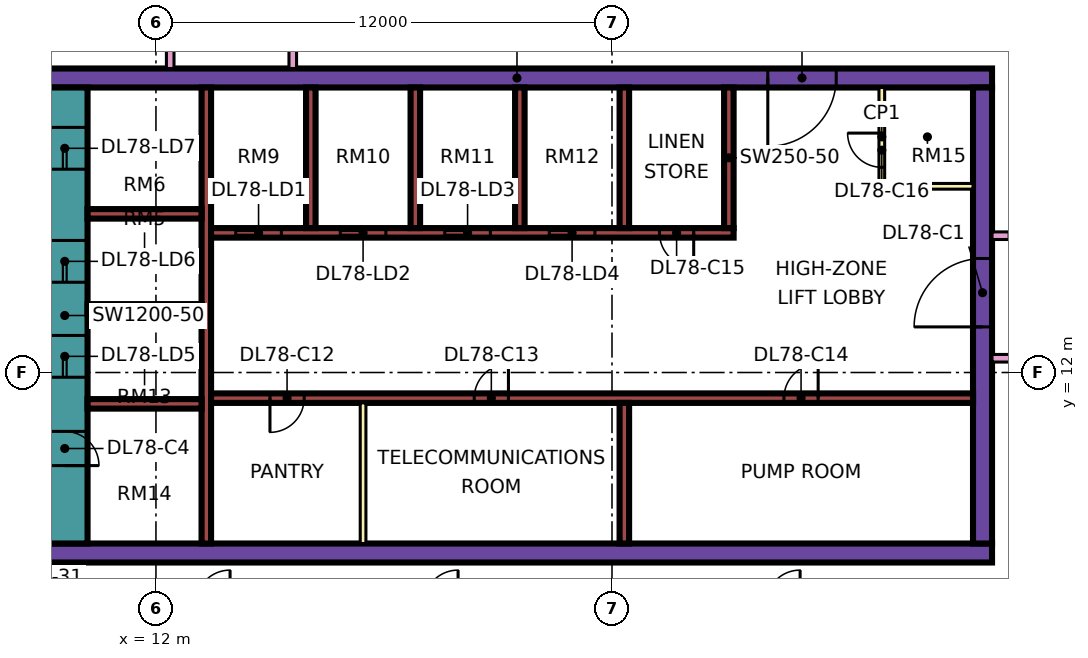
"""IFC4 building model, lengths in metres.
Left out: names, types, materials, properties, quantities, classifications, styles, units other than length and angle.
Written with IfcOpenShell. Run it as: python <this file> out.ifc"""

import sys

from ifc_helpers import new_model, si_unit, direction, frame, frame_2d, origin, place, context, subcontext, project, spatial, rectangle, extrude, element, fill, save


model = new_model("IFC4")
c1 = context("Model", 3, precision=1e-05, world=origin(), true_north=direction((0.0, 1.0)))
c2 = subcontext(c1, "Body", "Model", "MODEL_VIEW")
j1 = project(units=[si_unit("LENGTHUNIT", "METRE"), si_unit("PLANEANGLEUNIT", "RADIAN")], contexts=[c1])
p1 = place(None, origin())
s1 = spatial("IfcSite", under=j1, at=p1, CompositionType="ELEMENT")
p2 = place(p1, origin())
s2 = spatial("IfcBuilding", under=s1, at=p2, CompositionType="ELEMENT")
p3 = place(p2, frame((0.0, 0.0, 338.9)))
s3 = spatial("IfcBuildingStorey", under=s2, at=p3, CompositionType="ELEMENT", Elevation=338.9)
p4 = place(p3, frame((9.0, 7.25, 0.0), z_axis=(0.0, 0.0, 1.0), x_axis=(1.0, 0.0, 0.0)))
e1 = element("IfcWall", 1, at=p4, inside=s3, PredefinedType="SHEAR", context=c2, shape_type="SweptSolid", body=[
    extrude(rectangle(XDim=25.0, YDim=0.5, at=frame_2d((12.5, 0.0))), origin(), (0.0, 0.0, 1.0), 3.75),
])
p5 = place(p3, frame((9.0, 19.75, 0.0), z_axis=(0.0, 0.0, 1.0), x_axis=(1.0, 0.0, 0.0)))
e2 = element("IfcWall", 2, at=p5, inside=s3, PredefinedType="SHEAR", context=c2, shape_type="SweptSolid", body=[
    extrude(rectangle(XDim=25.0, YDim=0.5, at=frame_2d((12.5, 0.0))), origin(), (0.0, 0.0, 1.0), 3.75),
])
p6 = place(p5, frame((19.1, 0.0, 0.0)))
e3 = element("IfcOpeningElement", 3, at=p6, cuts=e2, PredefinedType="OPENING", context=c2, shape_type="SweptSolid", body=[
    extrude(rectangle(XDim=1.8, YDim=2.4, at=frame_2d((0.9, 1.2))), frame((0.0, 0.26, 0.0), z_axis=(0.0, -1.0, 0.0), x_axis=(1.0, 0.0, 0.0)), (0.0, 0.0, 1.0), 0.52),
])
p7 = place(p3, frame((9.6, 7.5, 0.0), z_axis=(0.0, 0.0, 1.0), x_axis=(0.0, 1.0, 0.0)))
e4 = element("IfcWall", 4, at=p7, inside=s3, PredefinedType="SHEAR", context=c2, shape_type="SweptSolid", body=[
    extrude(rectangle(XDim=12.0, YDim=1.2, at=frame_2d((6.0, 0.0))), origin(), (0.0, 0.0, 1.0), 3.75),
])
p8 = place(p7, frame((4.375, 0.0, 0.0)))
e5 = element("IfcOpeningElement", 5, at=p8, cuts=e4, PredefinedType="OPENING", context=c2, shape_type="SweptSolid", body=[
    extrude(rectangle(XDim=1.1, YDim=2.2, at=frame_2d((0.55, 1.1))), frame((0.0, 0.61, 0.0), z_axis=(0.0, -1.0, 0.0), x_axis=(1.0, 0.0, 0.0)), (0.0, 0.0, 1.0), 1.22),
])
p9 = place(p7, frame((6.875, 0.0, 0.0)))
e6 = element("IfcOpeningElement", 6, at=p9, cuts=e4, PredefinedType="OPENING", context=c2, shape_type="SweptSolid", body=[
    extrude(rectangle(XDim=1.1, YDim=2.2, at=frame_2d((0.55, 1.1))), frame((0.0, 0.61, 0.0), z_axis=(0.0, -1.0, 0.0), x_axis=(1.0, 0.0, 0.0)), (0.0, 0.0, 1.0), 1.22),
])
p10 = place(p7, frame((9.85, 0.0, 0.0)))
e7 = element("IfcOpeningElement", 7, at=p10, cuts=e4, PredefinedType="OPENING", context=c2, shape_type="SweptSolid", body=[
    extrude(rectangle(XDim=1.1, YDim=2.2, at=frame_2d((0.55, 1.1))), frame((0.0, 0.61, 0.0), z_axis=(0.0, -1.0, 0.0), x_axis=(1.0, 0.0, 0.0)), (0.0, 0.0, 1.0), 1.22),
])
p11 = place(p7, frame((2.05, 0.0, 0.0)))
e8 = element("IfcOpeningElement", 8, at=p11, cuts=e4, PredefinedType="OPENING", context=c2, shape_type="SweptSolid", body=[
    extrude(rectangle(XDim=0.9, YDim=2.1, at=frame_2d((0.45, 1.05))), frame((0.0, 0.61, 0.0), z_axis=(0.0, -1.0, 0.0), x_axis=(1.0, 0.0, 0.0)), (0.0, 0.0, 1.0), 1.22),
])
p12 = place(p3, frame((33.75, 7.5, 0.0), z_axis=(0.0, 0.0, 1.0), x_axis=(0.0, 1.0, 0.0)))
e9 = element("IfcWall", 9, at=p12, inside=s3, PredefinedType="SHEAR", context=c2, shape_type="SweptSolid", body=[
    extrude(rectangle(XDim=12.0, YDim=0.5, at=frame_2d((6.0, 0.0))), origin(), (0.0, 0.0, 1.0), 3.75),
])
p13 = place(p12, frame((5.7, 0.0, 0.0)))
e10 = element("IfcOpeningElement", 10, at=p13, cuts=e9, PredefinedType="OPENING", context=c2, shape_type="SweptSolid", body=[
    extrude(rectangle(XDim=1.8, YDim=2.4, at=frame_2d((0.9, 1.2))), frame((0.0, 0.26, 0.0), z_axis=(0.0, -1.0, 0.0), x_axis=(1.0, 0.0, 0.0)), (0.0, 0.0, 1.0), 0.52),
])
p14 = place(p3, frame((13.325, 7.5, 0.0), z_axis=(0.0, 0.0, 1.0), x_axis=(0.0, 1.0, 0.0)))
e11 = element("IfcWall", 11, at=p14, inside=s3, PredefinedType="SHEAR", context=c2, shape_type="SweptSolid", body=[
    extrude(rectangle(XDim=12.0, YDim=0.25, at=frame_2d((6.0, 0.0))), origin(), (0.0, 0.0, 1.0), 3.75),
])
p15 = place(p3, frame((13.45, 11.325, 0.0), z_axis=(0.0, 0.0, 1.0), x_axis=(1.0, 0.0, 0.0)))
e12 = element("IfcWall", 12, at=p15, inside=s3, PredefinedType="SHEAR", context=c2, shape_type="SweptSolid", body=[
    extrude(rectangle(XDim=20.05, YDim=0.25, at=frame_2d((10.025, 0.0))), origin(), (0.0, 0.0, 1.0), 3.75),
])
p16 = place(p15, frame((1.55, 0.0, 0.0)))
e13 = element("IfcOpeningElement", 13, at=p16, cuts=e12, PredefinedType="OPENING", context=c2, shape_type="SweptSolid", body=[
    extrude(rectangle(XDim=0.9, YDim=2.1, at=frame_2d((0.45, 1.05))), frame((0.0, 0.135, 0.0), z_axis=(0.0, -1.0, 0.0), x_axis=(1.0, 0.0, 0.0)), (0.0, 0.0, 1.0), 0.27),
])
p17 = place(p15, frame((6.925, 0.0, 0.0)))
e14 = element("IfcOpeningElement", 14, at=p17, cuts=e12, PredefinedType="OPENING", context=c2, shape_type="SweptSolid", body=[
    extrude(rectangle(XDim=0.9, YDim=2.1, at=frame_2d((0.45, 1.05))), frame((0.0, 0.135, 0.0), z_axis=(0.0, -1.0, 0.0), x_axis=(1.0, 0.0, 0.0)), (0.0, 0.0, 1.0), 0.27),
])
p18 = place(p15, frame((15.075, 0.0, 0.0)))
e15 = element("IfcOpeningElement", 15, at=p18, cuts=e12, PredefinedType="OPENING", context=c2, shape_type="SweptSolid", body=[
    extrude(rectangle(XDim=0.9, YDim=2.1, at=frame_2d((0.45, 1.05))), frame((0.0, 0.135, 0.0), z_axis=(0.0, -1.0, 0.0), x_axis=(1.0, 0.0, 0.0)), (0.0, 0.0, 1.0), 0.27),
])
p19 = place(p3, frame((13.45, 15.675, 0.0), z_axis=(0.0, 0.0, 1.0), x_axis=(1.0, 0.0, 0.0)))
e16 = element("IfcWall", 16, at=p19, inside=s3, PredefinedType="SHEAR", context=c2, shape_type="SweptSolid", body=[
    extrude(rectangle(XDim=13.75, YDim=0.25, at=frame_2d((6.875, 0.0))), origin(), (0.0, 0.0, 1.0), 3.75),
])
p20 = place(p19, frame((0.65, 0.0, 0.0)))
e17 = element("IfcOpeningElement", 17, at=p20, cuts=e16, PredefinedType="OPENING", context=c2, shape_type="SweptSolid", body=[
    extrude(rectangle(XDim=1.2, YDim=2.2, at=frame_2d((0.6, 1.1))), frame((0.0, 0.135, 0.0), z_axis=(0.0, -1.0, 0.0), x_axis=(1.0, 0.0, 0.0)), (0.0, 0.0, 1.0), 0.27),
])
p21 = place(p19, frame((3.4, 0.0, 0.0)))
e18 = element("IfcOpeningElement", 18, at=p21, cuts=e16, PredefinedType="OPENING", context=c2, shape_type="SweptSolid", body=[
    extrude(rectangle(XDim=1.2, YDim=2.2, at=frame_2d((0.6, 1.1))), frame((0.0, 0.135, 0.0), z_axis=(0.0, -1.0, 0.0), x_axis=(1.0, 0.0, 0.0)), (0.0, 0.0, 1.0), 0.27),
])
p22 = place(p19, frame((6.15, 0.0, 0.0)))
e19 = element("IfcOpeningElement", 19, at=p22, cuts=e16, PredefinedType="OPENING", context=c2, shape_type="SweptSolid", body=[
    extrude(rectangle(XDim=1.2, YDim=2.2, at=frame_2d((0.6, 1.1))), frame((0.0, 0.135, 0.0), z_axis=(0.0, -1.0, 0.0), x_axis=(1.0, 0.0, 0.0)), (0.0, 0.0, 1.0), 0.27),
])
p23 = place(p19, frame((8.9, 0.0, 0.0)))
e20 = element("IfcOpeningElement", 20, at=p23, cuts=e16, PredefinedType="OPENING", context=c2, shape_type="SweptSolid", body=[
    extrude(rectangle(XDim=1.2, YDim=2.2, at=frame_2d((0.6, 1.1))), frame((0.0, 0.135, 0.0), z_axis=(0.0, -1.0, 0.0), x_axis=(1.0, 0.0, 0.0)), (0.0, 0.0, 1.0), 0.27),
])
p24 = place(p19, frame((11.8, 0.0, 0.0)))
e21 = element("IfcOpeningElement", 21, at=p24, cuts=e16, PredefinedType="OPENING", context=c2, shape_type="SweptSolid", body=[
    extrude(rectangle(XDim=0.9, YDim=2.1, at=frame_2d((0.45, 1.05))), frame((0.0, 0.135, 0.0), z_axis=(0.0, -1.0, 0.0), x_axis=(1.0, 0.0, 0.0)), (0.0, 0.0, 1.0), 0.27),
])
for number, where, z_axis, x_axis in (
    (22, (10.2, 11.175, 0.0), (0.0, 0.0, 1.0), (1.0, 0.0, 0.0)),
    (23, (10.2, 13.675, 0.0), (0.0, 0.0, 1.0), (1.0, 0.0, 0.0)),
    (24, (10.2, 16.175, 0.0), (0.0, 0.0, 1.0), (1.0, 0.0, 0.0)),
):
    element("IfcWall", number, at=place(p3, frame(where, z_axis=z_axis, x_axis=x_axis)), inside=s3, PredefinedType="SHEAR", context=c2, shape_type="SweptSolid", body=[
        extrude(rectangle(XDim=3.0, YDim=0.25, at=frame_2d((1.5, 0.0))), origin(), (0.0, 0.0, 1.0), 3.75),
    ])
for number, where, z_axis, x_axis in (
    (25, (24.325, 7.5, 0.0), (0.0, 0.0, 1.0), (0.0, 1.0, 0.0)),
    (26, (16.075, 15.8, 0.0), (0.0, 0.0, 1.0), (0.0, 1.0, 0.0)),
    (27, (18.825, 15.8, 0.0), (0.0, 0.0, 1.0), (0.0, 1.0, 0.0)),
    (28, (21.575, 15.8, 0.0), (0.0, 0.0, 1.0), (0.0, 1.0, 0.0)),
    (29, (24.325, 15.8, 0.0), (0.0, 0.0, 1.0), (0.0, 1.0, 0.0)),
    (30, (27.075, 15.8, 0.0), (0.0, 0.0, 1.0), (0.0, 1.0, 0.0)),
):
    element("IfcWall", number, at=place(p3, frame(where, z_axis=z_axis, x_axis=x_axis)), inside=s3, PredefinedType="SHEAR", context=c2, shape_type="SweptSolid", body=[
        extrude(rectangle(XDim=3.7, YDim=0.25, at=frame_2d((1.85, 0.0))), origin(), (0.0, 0.0, 1.0), 3.75),
    ])
p25 = place(p3, frame((-1.447, 12.553, 0.0), z_axis=(0.0, 0.0, 1.0), x_axis=(0.707106781187, -0.707106781187, 0.0)))
e31 = element("IfcWall", 31, at=p25, inside=s3, PredefinedType="SOLIDWALL", context=c2, shape_type="SweptSolid", body=[
    extrude(rectangle(XDim=19.799, YDim=0.15, at=frame_2d((9.899, 0.0))), origin(), (0.0, 0.0, 1.0), 3.35),
])
p26 = place(p25, frame((2.212, 0.0, 0.45)))
e32 = element("IfcOpeningElement", 32, at=p26, cuts=e31, PredefinedType="OPENING", context=c2, shape_type="SweptSolid", body=[
    extrude(rectangle(XDim=3.0, YDim=2.4, at=frame_2d((1.5, 1.2))), frame((0.0, 0.085, 0.0), z_axis=(0.0, -1.0, 0.0), x_axis=(1.0, 0.0, 0.0)), (0.0, 0.0, 1.0), 0.17),
])
p27 = place(p25, frame((10.216, 0.0, 0.45)))
e33 = element("IfcOpeningElement", 33, at=p27, cuts=e31, PredefinedType="OPENING", context=c2, shape_type="SweptSolid", body=[
    extrude(rectangle(XDim=3.0, YDim=2.4, at=frame_2d((1.5, 1.2))), frame((0.0, 0.085, 0.0), z_axis=(0.0, -1.0, 0.0), x_axis=(1.0, 0.0, 0.0)), (0.0, 0.0, 1.0), 0.17),
])
p28 = place(p3, frame((17.45, 7.5, 0.0), z_axis=(0.0, 0.0, 1.0), x_axis=(0.0, 1.0, 0.0)))
e34 = element("IfcWall", 34, at=p28, inside=s3, PredefinedType="PARTITIONING", context=c2, shape_type="SweptSolid", body=[
    extrude(rectangle(XDim=3.7, YDim=0.15, at=frame_2d((1.85, 0.0))), origin(), (0.0, 0.0, 1.0), 3.35),
])
p29 = place(p3, frame((31.1, 16.9, 0.0), z_axis=(0.0, 0.0, 1.0), x_axis=(0.0, 1.0, 0.0)))
e35 = element("IfcWall", 35, at=p29, inside=s3, PredefinedType="PARTITIONING", context=c2, shape_type="SweptSolid", body=[
    extrude(rectangle(XDim=2.6, YDim=0.15, at=frame_2d((1.3, 0.0))), origin(), (0.0, 0.0, 1.0), 3.35),
])
p30 = place(p29, frame((0.5, 0.0, 0.0)))
e36 = element("IfcOpeningElement", 36, at=p30, cuts=e35, PredefinedType="OPENING", context=c2, shape_type="SweptSolid", body=[
    extrude(rectangle(XDim=0.9, YDim=2.1, at=frame_2d((0.45, 1.05))), frame((0.0, 0.085, 0.0), z_axis=(0.0, -1.0, 0.0), x_axis=(1.0, 0.0, 0.0)), (0.0, 0.0, 1.0), 0.17),
])
p31 = place(p3, frame((31.1, 16.9, 0.0), z_axis=(0.0, 0.0, 1.0), x_axis=(1.0, 0.0, 0.0)))
e37 = element("IfcWall", 37, at=p31, inside=s3, PredefinedType="PARTITIONING", context=c2, shape_type="SweptSolid", body=[
    extrude(rectangle(XDim=2.4, YDim=0.15, at=frame_2d((1.2, 0.0))), origin(), (0.0, 0.0, 1.0), 3.35),
])
p32 = place(p3, frame((12.375, 20.0, 0.0), z_axis=(0.0, 0.0, 1.0), x_axis=(0.0, 1.0, 0.0)))
e38 = element("IfcWall", 38, at=p32, inside=s3, PredefinedType="PARTITIONING", context=c2, shape_type="SweptSolid", body=[
    extrude(rectangle(XDim=34.0, YDim=0.2, at=frame_2d((17.0, 0.0))), origin(), (0.0, 0.0, 1.0), 3.35),
])
p33 = place(p32, frame((31.8, 0.0, 0.0)))
e39 = element("IfcOpeningElement", 39, at=p33, cuts=e38, PredefinedType="OPENING", context=c2, shape_type="SweptSolid", body=[
    extrude(rectangle(XDim=1.0, YDim=2.1, at=frame_2d((0.5, 1.05))), frame((0.0, 0.11, 0.0), z_axis=(0.0, -1.0, 0.0), x_axis=(1.0, 0.0, 0.0)), (0.0, 0.0, 1.0), 0.22),
])
p34 = place(p32, frame((0.6, 0.0, 0.0)))
e40 = element("IfcOpeningElement", 40, at=p34, cuts=e38, PredefinedType="OPENING", context=c2, shape_type="SweptSolid", body=[
    extrude(rectangle(XDim=1.2, YDim=2.1, at=frame_2d((0.6, 1.05))), frame((0.0, 0.11, 0.0), z_axis=(0.0, -1.0, 0.0), x_axis=(1.0, 0.0, 0.0)), (0.0, 0.0, 1.0), 0.22),
])
p35 = place(p32, frame((14.1, 0.0, 0.0)))
e41 = element("IfcOpeningElement", 41, at=p35, cuts=e38, PredefinedType="OPENING", context=c2, shape_type="SweptSolid", body=[
    extrude(rectangle(XDim=1.0, YDim=2.1, at=frame_2d((0.5, 1.05))), frame((0.0, 0.11, 0.0), z_axis=(0.0, -1.0, 0.0), x_axis=(1.0, 0.0, 0.0)), (0.0, 0.0, 1.0), 0.22),
])
p36 = place(p3, frame((15.6, 20.0, 0.0), z_axis=(0.0, 0.0, 1.0), x_axis=(0.0, 1.0, 0.0)))
e42 = element("IfcWall", 42, at=p36, inside=s3, PredefinedType="PARTITIONING", context=c2, shape_type="SweptSolid", body=[
    extrude(rectangle(XDim=27.775, YDim=0.2, at=frame_2d((13.887, 0.0))), origin(), (0.0, 0.0, 1.0), 3.35),
])
p37 = place(p36, frame((6.25, 0.0, 0.0)))
e43 = element("IfcOpeningElement", 43, at=p37, cuts=e42, PredefinedType="OPENING", context=c2, shape_type="SweptSolid", body=[
    extrude(rectangle(XDim=1.6, YDim=2.1, at=frame_2d((0.8, 1.05))), frame((0.0, 0.11, 0.0), z_axis=(0.0, -1.0, 0.0), x_axis=(1.0, 0.0, 0.0)), (0.0, 0.0, 1.0), 0.22),
])
p38 = place(p36, frame((12.55, 0.0, 0.0)))
e44 = element("IfcOpeningElement", 44, at=p38, cuts=e42, PredefinedType="OPENING", context=c2, shape_type="SweptSolid", body=[
    extrude(rectangle(XDim=1.0, YDim=2.1, at=frame_2d((0.5, 1.05))), frame((0.0, 0.11, 0.0), z_axis=(0.0, -1.0, 0.0), x_axis=(1.0, 0.0, 0.0)), (0.0, 0.0, 1.0), 0.22),
])
p39 = place(p36, frame((22.9, 0.0, 0.0)))
e45 = element("IfcOpeningElement", 45, at=p39, cuts=e42, PredefinedType="OPENING", context=c2, shape_type="SweptSolid", body=[
    extrude(rectangle(XDim=1.0, YDim=2.1, at=frame_2d((0.5, 1.05))), frame((0.0, 0.11, 0.0), z_axis=(0.0, -1.0, 0.0), x_axis=(1.0, 0.0, 0.0)), (0.0, 0.0, 1.0), 0.22),
])
p40 = place(p36, frame((1.15, 0.0, 0.0)))
e46 = element("IfcOpeningElement", 46, at=p40, cuts=e42, PredefinedType="OPENING", context=c2, shape_type="SweptSolid", body=[
    extrude(rectangle(XDim=1.8, YDim=2.1, at=frame_2d((0.9, 1.05))), frame((0.0, 0.11, 0.0), z_axis=(0.0, -1.0, 0.0), x_axis=(1.0, 0.0, 0.0)), (0.0, 0.0, 1.0), 0.22),
])
p41 = place(p36, frame((25.9, 0.0, 0.0)))
e47 = element("IfcOpeningElement", 47, at=p41, cuts=e42, PredefinedType="OPENING", context=c2, shape_type="SweptSolid", body=[
    extrude(rectangle(XDim=1.0, YDim=2.1, at=frame_2d((0.5, 1.05))), frame((0.0, 0.11, 0.0), z_axis=(0.0, -1.0, 0.0), x_axis=(1.0, 0.0, 0.0)), (0.0, 0.0, 1.0), 0.22),
])
p42 = place(p3, frame((34.0, 12.375, 0.0), z_axis=(0.0, 0.0, 1.0), x_axis=(1.0, 0.0, 0.0)))
e48 = element("IfcWall", 48, at=p42, inside=s3, PredefinedType="PARTITIONING", context=c2, shape_type="SweptSolid", body=[
    extrude(rectangle(XDim=2.376, YDim=0.2, at=frame_2d((1.188, 0.0))), origin(), (0.0, 0.0, 1.0), 3.35),
])
p43 = place(p3, frame((34.0, 15.6, 0.0), z_axis=(0.0, 0.0, 1.0), x_axis=(1.0, 0.0, 0.0)))
e49 = element("IfcWall", 49, at=p43, inside=s3, PredefinedType="PARTITIONING", context=c2, shape_type="SweptSolid", body=[
    extrude(rectangle(XDim=10.35, YDim=0.2, at=frame_2d((5.175, 0.0))), origin(), (0.0, 0.0, 1.0), 3.35),
])
p44 = place(p43, frame((5.6, 0.0, 0.0)))
e50 = element("IfcOpeningElement", 50, at=p44, cuts=e49, PredefinedType="OPENING", context=c2, shape_type="SweptSolid", body=[
    extrude(rectangle(XDim=1.0, YDim=2.1, at=frame_2d((0.5, 1.05))), frame((0.0, 0.11, 0.0), z_axis=(0.0, -1.0, 0.0), x_axis=(1.0, 0.0, 0.0)), (0.0, 0.0, 1.0), 0.22),
])
p45 = place(p43, frame((0.45, 0.0, 0.0)))
e51 = element("IfcOpeningElement", 51, at=p45, cuts=e49, PredefinedType="OPENING", context=c2, shape_type="SweptSolid", body=[
    extrude(rectangle(XDim=1.2, YDim=2.1, at=frame_2d((0.6, 1.05))), frame((0.0, 0.11, 0.0), z_axis=(0.0, -1.0, 0.0), x_axis=(1.0, 0.0, 0.0)), (0.0, 0.0, 1.0), 0.22),
])
p46 = place(p20, origin())
e52 = element("IfcDoor", 52, at=p46, inside=s3, OperationType="DOUBLE_DOOR_SLIDING", PredefinedType="DOOR", context=c2, shape_type="SweptSolid", body=[
    extrude(rectangle(XDim=1.2, YDim=2.2, at=frame_2d((0.6, 1.1))), frame((0.0, 0.025, 0.0), z_axis=(0.0, -1.0, 0.0), x_axis=(1.0, 0.0, 0.0)), (0.0, 0.0, 1.0), 0.05),
])
fill(e17, e52)
p47 = place(p21, origin())
e53 = element("IfcDoor", 53, at=p47, inside=s3, OperationType="DOUBLE_DOOR_SLIDING", PredefinedType="DOOR", context=c2, shape_type="SweptSolid", body=[
    extrude(rectangle(XDim=1.2, YDim=2.2, at=frame_2d((0.6, 1.1))), frame((0.0, 0.025, 0.0), z_axis=(0.0, -1.0, 0.0), x_axis=(1.0, 0.0, 0.0)), (0.0, 0.0, 1.0), 0.05),
])
fill(e18, e53)
p48 = place(p22, origin())
e54 = element("IfcDoor", 54, at=p48, inside=s3, OperationType="DOUBLE_DOOR_SLIDING", PredefinedType="DOOR", context=c2, shape_type="SweptSolid", body=[
    extrude(rectangle(XDim=1.2, YDim=2.2, at=frame_2d((0.6, 1.1))), frame((0.0, 0.025, 0.0), z_axis=(0.0, -1.0, 0.0), x_axis=(1.0, 0.0, 0.0)), (0.0, 0.0, 1.0), 0.05),
])
fill(e19, e54)
p49 = place(p23, origin())
e55 = element("IfcDoor", 55, at=p49, inside=s3, OperationType="DOUBLE_DOOR_SLIDING", PredefinedType="DOOR", context=c2, shape_type="SweptSolid", body=[
    extrude(rectangle(XDim=1.2, YDim=2.2, at=frame_2d((0.6, 1.1))), frame((0.0, 0.025, 0.0), z_axis=(0.0, -1.0, 0.0), x_axis=(1.0, 0.0, 0.0)), (0.0, 0.0, 1.0), 0.05),
])
fill(e20, e55)
p50 = place(p8, origin())
e56 = element("IfcDoor", 56, at=p50, inside=s3, OperationType="DOUBLE_DOOR_SLIDING", PredefinedType="DOOR", context=c2, shape_type="SweptSolid", body=[
    extrude(rectangle(XDim=1.1, YDim=2.2, at=frame_2d((0.55, 1.1))), frame((0.0, 0.025, 0.0), z_axis=(0.0, -1.0, 0.0), x_axis=(1.0, 0.0, 0.0)), (0.0, 0.0, 1.0), 0.05),
])
fill(e5, e56)
p51 = place(p9, origin())
e57 = element("IfcDoor", 57, at=p51, inside=s3, OperationType="DOUBLE_DOOR_SLIDING", PredefinedType="DOOR", context=c2, shape_type="SweptSolid", body=[
    extrude(rectangle(XDim=1.1, YDim=2.2, at=frame_2d((0.55, 1.1))), frame((0.0, 0.025, 0.0), z_axis=(0.0, -1.0, 0.0), x_axis=(1.0, 0.0, 0.0)), (0.0, 0.0, 1.0), 0.05),
])
fill(e6, e57)
p52 = place(p10, origin())
e58 = element("IfcDoor", 58, at=p52, inside=s3, OperationType="DOUBLE_DOOR_SLIDING", PredefinedType="DOOR", context=c2, shape_type="SweptSolid", body=[
    extrude(rectangle(XDim=1.1, YDim=2.2, at=frame_2d((0.55, 1.1))), frame((0.0, 0.025, 0.0), z_axis=(0.0, -1.0, 0.0), x_axis=(1.0, 0.0, 0.0)), (0.0, 0.0, 1.0), 0.05),
])
fill(e7, e58)
p53 = place(p13, origin())
e59 = element("IfcDoor", 59, at=p53, inside=s3, OperationType="DOUBLE_DOOR_SINGLE_SWING", PredefinedType="DOOR", context=c2, shape_type="SweptSolid", body=[
    extrude(rectangle(XDim=1.8, YDim=2.4, at=frame_2d((0.9, 1.2))), frame((0.0, 0.025, 0.0), z_axis=(0.0, -1.0, 0.0), x_axis=(1.0, 0.0, 0.0)), (0.0, 0.0, 1.0), 0.05),
])
fill(e10, e59)
p54 = place(p6, frame((1.8, 0.0, 0.0), z_axis=(0.0, 0.0, 1.0), x_axis=(-1.0, 0.0, 0.0)))
e60 = element("IfcDoor", 60, at=p54, inside=s3, OperationType="DOUBLE_DOOR_SINGLE_SWING", PredefinedType="DOOR", context=c2, shape_type="SweptSolid", body=[
    extrude(rectangle(XDim=1.8, YDim=2.4, at=frame_2d((0.9, 1.2))), frame((0.0, 0.025, 0.0), z_axis=(0.0, -1.0, 0.0), x_axis=(1.0, 0.0, 0.0)), (0.0, 0.0, 1.0), 0.05),
])
fill(e3, e60)
p55 = place(p11, frame((0.9, 0.0, 0.0), z_axis=(0.0, 0.0, 1.0), x_axis=(-1.0, 0.0, 0.0)))
e61 = element("IfcDoor", 61, at=p55, inside=s3, OperationType="SINGLE_SWING_LEFT", PredefinedType="DOOR", context=c2, shape_type="SweptSolid", body=[
    extrude(rectangle(XDim=0.9, YDim=2.1, at=frame_2d((0.45, 1.05))), frame((0.0, 0.025, 0.0), z_axis=(0.0, -1.0, 0.0), x_axis=(1.0, 0.0, 0.0)), (0.0, 0.0, 1.0), 0.05),
])
fill(e8, e61)
p56 = place(p16, frame((0.9, 0.0, 0.0), z_axis=(0.0, 0.0, 1.0), x_axis=(-1.0, 0.0, 0.0)))
e62 = element("IfcDoor", 62, at=p56, inside=s3, OperationType="SINGLE_SWING_LEFT", PredefinedType="DOOR", context=c2, shape_type="SweptSolid", body=[
    extrude(rectangle(XDim=0.9, YDim=2.1, at=frame_2d((0.45, 1.05))), frame((0.0, 0.025, 0.0), z_axis=(0.0, -1.0, 0.0), x_axis=(1.0, 0.0, 0.0)), (0.0, 0.0, 1.0), 0.05),
])
fill(e13, e62)
p57 = place(p17, frame((0.9, 0.0, 0.0), z_axis=(0.0, 0.0, 1.0), x_axis=(-1.0, 0.0, 0.0)))
e63 = element("IfcDoor", 63, at=p57, inside=s3, OperationType="SINGLE_SWING_RIGHT", PredefinedType="DOOR", context=c2, shape_type="SweptSolid", body=[
    extrude(rectangle(XDim=0.9, YDim=2.1, at=frame_2d((0.45, 1.05))), frame((0.0, 0.025, 0.0), z_axis=(0.0, -1.0, 0.0), x_axis=(1.0, 0.0, 0.0)), (0.0, 0.0, 1.0), 0.05),
])
fill(e14, e63)
p58 = place(p18, frame((0.9, 0.0, 0.0), z_axis=(0.0, 0.0, 1.0), x_axis=(-1.0, 0.0, 0.0)))
e64 = element("IfcDoor", 64, at=p58, inside=s3, OperationType="SINGLE_SWING_RIGHT", PredefinedType="DOOR", context=c2, shape_type="SweptSolid", body=[
    extrude(rectangle(XDim=0.9, YDim=2.1, at=frame_2d((0.45, 1.05))), frame((0.0, 0.025, 0.0), z_axis=(0.0, -1.0, 0.0), x_axis=(1.0, 0.0, 0.0)), (0.0, 0.0, 1.0), 0.05),
])
fill(e15, e64)
p59 = place(p24, origin())
e65 = element("IfcDoor", 65, at=p59, inside=s3, OperationType="SINGLE_SWING_RIGHT", PredefinedType="DOOR", context=c2, shape_type="SweptSolid", body=[
    extrude(rectangle(XDim=0.9, YDim=2.1, at=frame_2d((0.45, 1.05))), frame((0.0, 0.025, 0.0), z_axis=(0.0, -1.0, 0.0), x_axis=(1.0, 0.0, 0.0)), (0.0, 0.0, 1.0), 0.05),
])
fill(e21, e65)
p60 = place(p30, frame((0.9, 0.0, 0.0), z_axis=(0.0, 0.0, 1.0), x_axis=(-1.0, 0.0, 0.0)))
e66 = element("IfcDoor", 66, at=p60, inside=s3, OperationType="SINGLE_SWING_RIGHT", PredefinedType="DOOR", context=c2, shape_type="SweptSolid", body=[
    extrude(rectangle(XDim=0.9, YDim=2.1, at=frame_2d((0.45, 1.05))), frame((0.0, 0.025, 0.0), z_axis=(0.0, -1.0, 0.0), x_axis=(1.0, 0.0, 0.0)), (0.0, 0.0, 1.0), 0.05),
])
fill(e36, e66)
save(model, sys.argv[1])
